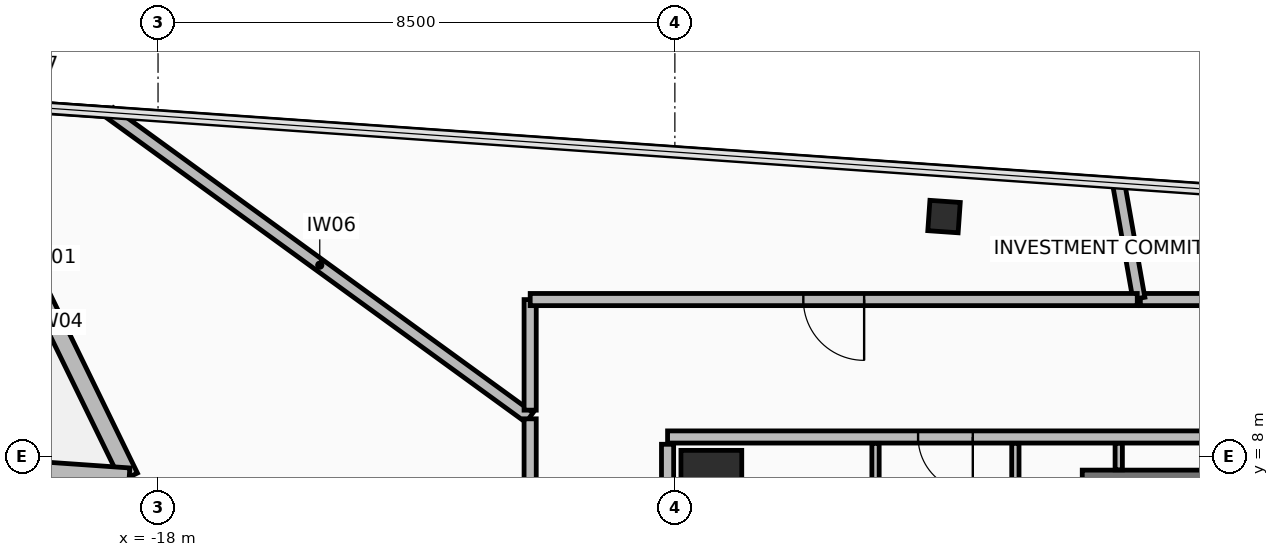
"""IFC4 building model, lengths in metres.
Left out: names, types, materials, properties, quantities, classifications, styles, units other than length and angle.
Written with IfcOpenShell. Run it as: python <this file> out.ifc"""

import sys

from ifc_helpers import new_model, si_unit, direction, frame, frame_2d, origin, origin_2d, place, context, subcontext, project, spatial, rectangle, hollow_rectangle, extrude, element, fill, save


model = new_model("IFC4")
c1 = context("Model", 3, precision=1e-05, world=origin(), true_north=direction((0.0, 1.0)))
c2 = subcontext(c1, "Body", "Model", "MODEL_VIEW")
j1 = project(units=[si_unit("LENGTHUNIT", "METRE"), si_unit("PLANEANGLEUNIT", "RADIAN")], contexts=[c1])
p1 = place(None, origin())
s1 = spatial("IfcSite", under=j1, at=p1, CompositionType="ELEMENT")
p2 = place(p1, origin())
s2 = spatial("IfcBuilding", under=s1, at=p2, CompositionType="ELEMENT")
p3 = place(p2, frame((0.0, 0.0, 245.05)))
s3 = spatial("IfcBuildingStorey", under=s2, at=p3, CompositionType="ELEMENT", Elevation=245.05)
p4 = place(p3, frame((-8.9, 7.6, 0.0), z_axis=(0.0, 0.0, 1.0), x_axis=(1.0, 0.0, 0.0)))
e1 = element("IfcColumn", 1, at=p4, inside=s3, PredefinedType="COLUMN", context=c2, shape_type="SweptSolid", body=[
    extrude(rectangle(XDim=1.0, YDim=1.0, at=origin_2d()), origin(), (0.0, 0.0, 1.0), 3.6),
])
p5 = place(p3, frame((-5.073, 11.945, 0.0), z_axis=(0.0, 0.0, 1.0), x_axis=(-0.99756405026, 0.069756473744, 0.0)))
e2 = element("IfcColumn", 2, at=p5, inside=s3, PredefinedType="COLUMN", context=c2, shape_type="SweptSolid", body=[
    extrude(hollow_rectangle(XDim=0.5, YDim=0.5, WallThickness=0.032, at=origin_2d()), origin(), (0.0, 0.0, 1.0), 3.6),
])
p6 = place(p3, frame((-21.49, 13.844, 0.0), z_axis=(0.0, 0.0, 1.0), x_axis=(0.438391471143, -0.898784133165, 0.0)))
e3 = element("IfcWall", 3, at=p6, inside=s3, PredefinedType="STANDARD", context=c2, shape_type="SweptSolid", body=[
    extrude(rectangle(XDim=6.88, YDim=0.3, at=frame_2d((3.44, 0.0))), origin(), (0.0, 0.0, 1.0), 2.765),
])
p7 = place(p6, frame((2.84, 0.0, 0.485)))
e4 = element("IfcOpeningElement", 4, at=p7, cuts=e3, PredefinedType="OPENING", context=c2, shape_type="SweptSolid", body=[
    extrude(rectangle(XDim=1.2, YDim=2.1, at=frame_2d((0.6, 1.05))), frame((0.0, 0.16, 0.0), z_axis=(0.0, -1.0, 0.0), x_axis=(1.0, 0.0, 0.0)), (0.0, 0.0, 1.0), 0.32),
])
p8 = place(p3, frame((-18.474, 7.661, 0.0), z_axis=(0.0, 0.0, 1.0), x_axis=(-0.997565982203, 0.069728840176, 0.0)))
e5 = element("IfcWall", 5, at=p8, inside=s3, PredefinedType="STANDARD", context=c2, shape_type="SweptSolid", body=[
    extrude(rectangle(XDim=6.88, YDim=0.3, at=frame_2d((3.44, 0.0))), origin(), (0.0, 0.0, 1.0), 2.765),
])
p9 = place(p8, frame((2.532, 0.0, 0.0)))
e6 = element("IfcOpeningElement", 6, at=p9, cuts=e5, PredefinedType="OPENING", context=c2, shape_type="SweptSolid", body=[
    extrude(rectangle(XDim=1.1, YDim=2.2, at=frame_2d((0.55, 1.1))), frame((0.0, 0.16, 0.0), z_axis=(0.0, -1.0, 0.0), x_axis=(1.0, 0.0, 0.0)), (0.0, 0.0, 1.0), 0.32),
])
p10 = place(p3, frame((-2.8, 7.6, 0.0), z_axis=(0.0, 0.0, 1.0), x_axis=(1.0, 0.0, 0.0)))
e7 = element("IfcWall", 7, at=p10, inside=s3, PredefinedType="SHEAR", context=c2, shape_type="SweptSolid", body=[
    extrude(rectangle(XDim=5.38, YDim=0.35, at=frame_2d((2.69, 0.0))), origin(), (0.0, 0.0, 1.0), 3.42),
])
p11 = place(p3, frame((9.62, 8.32, 0.0), z_axis=(0.0, 0.0, 1.0), x_axis=(-1.0, 0.0, 0.0)))
e8 = element("IfcWall", 8, at=p11, inside=s3, PredefinedType="PARTITIONING", context=c2, shape_type="SweptSolid", body=[
    extrude(rectangle(XDim=19.24, YDim=0.2, at=frame_2d((9.62, 0.0))), origin(), (0.0, 0.0, 1.0), 2.915),
])
p12 = place(p11, frame((8.67, 0.0, 0.0)))
e9 = element("IfcOpeningElement", 9, at=p12, cuts=e8, PredefinedType="OPENING", context=c2, shape_type="SweptSolid", body=[
    extrude(rectangle(XDim=0.9, YDim=2.1, at=frame_2d((0.45, 1.05))), frame((0.0, 0.11, 0.0), z_axis=(0.0, -1.0, 0.0), x_axis=(1.0, 0.0, 0.0)), (0.0, 0.0, 1.0), 0.22),
])
p13 = place(p11, frame((14.22, 0.0, 0.0)))
e10 = element("IfcOpeningElement", 10, at=p13, cuts=e8, PredefinedType="OPENING", context=c2, shape_type="SweptSolid", body=[
    extrude(rectangle(XDim=0.9, YDim=2.1, at=frame_2d((0.45, 1.05))), frame((0.0, 0.11, 0.0), z_axis=(0.0, -1.0, 0.0), x_axis=(1.0, 0.0, 0.0)), (0.0, 0.0, 1.0), 0.22),
])
p14 = place(p3, frame((-9.62, 8.2, 0.0), z_axis=(0.0, 0.0, 1.0), x_axis=(0.0, -1.0, 0.0)))
e11 = element("IfcWall", 11, at=p14, inside=s3, PredefinedType="PARTITIONING", context=c2, shape_type="SweptSolid", body=[
    extrude(rectangle(XDim=16.4, YDim=0.2, at=frame_2d((8.2, 0.0))), origin(), (0.0, 0.0, 1.0), 2.765),
])
p15 = place(p14, frame((12.65, 0.0, 0.0)))
e12 = element("IfcOpeningElement", 12, at=p15, cuts=e11, PredefinedType="OPENING", context=c2, shape_type="SweptSolid", body=[
    extrude(rectangle(XDim=1.1, YDim=2.15, at=frame_2d((0.55, 1.075))), frame((0.0, 0.11, 0.0), z_axis=(0.0, -1.0, 0.0), x_axis=(1.0, 0.0, 0.0)), (0.0, 0.0, 1.0), 0.22),
])
p16 = place(p3, frame((-2.2, 8.215, 0.0), z_axis=(0.0, 0.0, 1.0), x_axis=(0.0, -1.0, 0.0)))
e13 = element("IfcWall", 13, at=p16, inside=s3, PredefinedType="PARTITIONING", context=c2, shape_type="SweptSolid", body=[
    extrude(rectangle(XDim=0.435, YDim=0.12, at=frame_2d((0.218, 0.0))), origin(), (0.0, 0.0, 1.0), 2.715),
])
for number, where, z_axis, x_axis in (
    (14, (-3.9, 5.465, 0.0), (0.0, 0.0, 1.0), (0.0, 1.0, 0.0)),
    (15, (-6.2, 8.215, 0.0), (0.0, 0.0, 1.0), (0.0, -1.0, 0.0)),
):
    element("IfcWall", number, at=place(p3, frame(where, z_axis=z_axis, x_axis=x_axis)), inside=s3, PredefinedType="PARTITIONING", context=c2, shape_type="SweptSolid", body=[
        extrude(rectangle(XDim=2.75, YDim=0.12, at=frame_2d((1.375, 0.0))), origin(), (0.0, 0.0, 1.0), 2.715),
    ])
p17 = place(p3, frame((-21.311, 13.832, 0.0), z_axis=(0.0, 0.0, 1.0), x_axis=(0.997559711148, -0.06981849823, 0.0)))
e16 = element("IfcWall", 16, at=p17, inside=s3, PredefinedType="PARTITIONING", context=c2, shape_type="SweptSolid", body=[
    extrude(rectangle(XDim=2.514, YDim=0.15, at=frame_2d((1.257, 0.0))), origin(), (0.0, 0.0, 1.0), 3.42),
])
p18 = place(p3, frame((-18.79, 13.652, 0.0), z_axis=(0.0, 0.0, 1.0), x_axis=(0.809024412074, -0.58777504257, 0.0)))
e17 = element("IfcWall", 17, at=p18, inside=s3, PredefinedType="PARTITIONING", context=c2, shape_type="SweptSolid", body=[
    extrude(rectangle(XDim=8.529, YDim=0.2, at=frame_2d((4.264, 0.0))), origin(), (0.0, 0.0, 1.0), 2.765),
])
p19 = place(p3, frame((-11.88, 8.619, 0.0), z_axis=(0.0, 0.0, 1.0), x_axis=(0.0, -1.0, 0.0)))
e18 = element("IfcWall", 18, at=p19, inside=s3, PredefinedType="PARTITIONING", context=c2, shape_type="SweptSolid", body=[
    extrude(rectangle(XDim=10.267, YDim=0.2, at=frame_2d((5.133, 0.0))), origin(), (0.0, 0.0, 1.0), 2.765),
])
p20 = place(p19, frame((4.708, 0.0, 0.0)))
e19 = element("IfcOpeningElement", 19, at=p20, cuts=e18, PredefinedType="OPENING", context=c2, shape_type="SweptSolid", body=[
    extrude(rectangle(XDim=0.85, YDim=2.1, at=frame_2d((0.425, 1.05))), frame((0.0, 0.11, 0.0), z_axis=(0.0, -1.0, 0.0), x_axis=(1.0, 0.0, 0.0)), (0.0, 0.0, 1.0), 0.22),
])
p21 = place(p3, frame((5.611, 10.58, 0.0), z_axis=(0.0, 0.0, 1.0), x_axis=(-1.0, 0.0, 0.0)))
e20 = element("IfcWall", 20, at=p21, inside=s3, PredefinedType="PARTITIONING", context=c2, shape_type="SweptSolid", body=[
    extrude(rectangle(XDim=7.455, YDim=0.2, at=frame_2d((3.728, 0.0))), origin(), (0.0, 0.0, 1.0), 3.42),
])
p22 = place(p21, frame((3.128, 0.0, 0.0)))
e21 = element("IfcOpeningElement", 21, at=p22, cuts=e20, PredefinedType="OPENING", context=c2, shape_type="SweptSolid", body=[
    extrude(rectangle(XDim=1.2, YDim=2.15, at=frame_2d((0.6, 1.075))), frame((0.0, 0.11, 0.0), z_axis=(0.0, -1.0, 0.0), x_axis=(1.0, 0.0, 0.0)), (0.0, 0.0, 1.0), 0.22),
])
p23 = place(p3, frame((-1.869, 10.601, 0.0), z_axis=(0.0, 0.0, 1.0), x_axis=(-0.173669542229, 0.984803985625, 0.0)))
e22 = element("IfcWall", 22, at=p23, inside=s3, PredefinedType="PARTITIONING", context=c2, shape_type="SweptSolid", body=[
    extrude(rectangle(XDim=1.925, YDim=0.2, at=frame_2d((0.962, 0.0))), origin(), (0.0, 0.0, 1.0), 2.765),
])
p24 = place(p3, frame((-11.88, 10.579, 0.0), z_axis=(0.0, 0.0, 1.0), x_axis=(0.0, -1.0, 0.0)))
e23 = element("IfcWall", 23, at=p24, inside=s3, PredefinedType="PARTITIONING", context=c2, shape_type="SweptSolid", body=[
    extrude(rectangle(XDim=1.818, YDim=0.2, at=frame_2d((0.909, 0.0))), origin(), (0.0, 0.0, 1.0), 2.915),
])
p25 = place(p3, frame((-1.895, 10.58, 0.0), z_axis=(0.0, 0.0, 1.0), x_axis=(-1.0, 0.0, 0.0)))
e24 = element("IfcWall", 24, at=p25, inside=s3, PredefinedType="PARTITIONING", context=c2, shape_type="SweptSolid", body=[
    extrude(rectangle(XDim=9.984, YDim=0.2, at=frame_2d((4.992, 0.0))), origin(), (0.0, 0.0, 1.0), 2.915),
])
p26 = place(p25, frame((4.492, 0.0, 0.0)))
e25 = element("IfcOpeningElement", 25, at=p26, cuts=e24, PredefinedType="OPENING", context=c2, shape_type="SweptSolid", body=[
    extrude(rectangle(XDim=1.0, YDim=2.15, at=frame_2d((0.5, 1.075))), frame((0.0, 0.11, 0.0), z_axis=(0.0, -1.0, 0.0), x_axis=(1.0, 0.0, 0.0)), (0.0, 0.0, 1.0), 0.22),
])
p27 = place(p7, origin())
e26 = element("IfcWindow", 26, at=p27, inside=s3, PartitioningType="SINGLE_PANEL", PredefinedType="WINDOW", context=c2, shape_type="SweptSolid", body=[
    extrude(rectangle(XDim=1.2, YDim=2.1, at=frame_2d((0.6, 1.05))), frame((0.0, 0.03, 0.0), z_axis=(0.0, -1.0, 0.0), x_axis=(1.0, 0.0, 0.0)), (0.0, 0.0, 1.0), 0.06),
])
fill(e4, e26)
p28 = place(p13, origin())
e27 = element("IfcDoor", 27, at=p28, inside=s3, OperationType="SINGLE_SWING_LEFT", PredefinedType="DOOR", context=c2, shape_type="SweptSolid", body=[
    extrude(rectangle(XDim=0.9, YDim=2.1, at=frame_2d((0.45, 1.05))), frame((0.0, 0.025, 0.0), z_axis=(0.0, -1.0, 0.0), x_axis=(1.0, 0.0, 0.0)), (0.0, 0.0, 1.0), 0.05),
])
fill(e10, e27)
p29 = place(p26, origin())
e28 = element("IfcDoor", 28, at=p29, inside=s3, OperationType="SINGLE_SWING_RIGHT", PredefinedType="DOOR", context=c2, shape_type="SweptSolid", body=[
    extrude(rectangle(XDim=1.0, YDim=2.15, at=frame_2d((0.5, 1.075))), frame((0.0, 0.025, 0.0), z_axis=(0.0, -1.0, 0.0), x_axis=(1.0, 0.0, 0.0)), (0.0, 0.0, 1.0), 0.05),
])
fill(e25, e28)
save(model, sys.argv[1])
